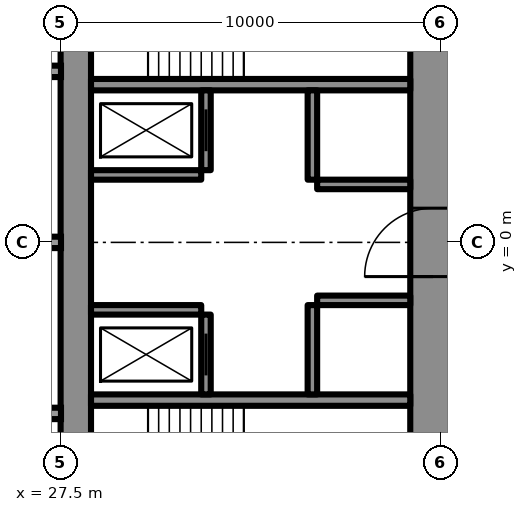
"""IFC4 building model, lengths in metres.
Left out: names, types, materials, properties, quantities, classifications, styles, units other than length and angle.
Written with IfcOpenShell. Run it as: python <this file> out.ifc"""

import sys

from ifc_helpers import new_model, si_unit, direction, frame, frame_2d, origin, place, context, subcontext, project, spatial, rectangle, extrude, element, fill, save


model = new_model("IFC4")
c1 = context("Model", 3, precision=1e-05, world=origin(), true_north=direction((0.0, 1.0)))
c2 = subcontext(c1, "Body", "Model", "MODEL_VIEW")
j1 = project(units=[si_unit("LENGTHUNIT", "METRE"), si_unit("PLANEANGLEUNIT", "RADIAN")], contexts=[c1])
p1 = place(None, origin())
s1 = spatial("IfcSite", under=j1, at=p1, CompositionType="ELEMENT")
p2 = place(p1, origin())
s2 = spatial("IfcBuilding", under=s1, at=p2, CompositionType="ELEMENT")
p3 = place(p2, frame((0.0, 0.0, 139.6)))
s3 = spatial("IfcBuildingStorey", under=s2, at=p3, CompositionType="ELEMENT", Elevation=139.6)
p4 = place(p3, frame((27.9, -8.6, 0.0), z_axis=(0.0, 0.0, 1.0), x_axis=(0.0, 1.0, 0.0)))
e1 = element("IfcWall", 1, at=p4, inside=s3, PredefinedType="SHEAR", context=c2, shape_type="SweptSolid", body=[
    extrude(rectangle(XDim=17.2, YDim=0.8, at=frame_2d((8.6, 0.0))), origin(), (0.0, 0.0, 1.0), 3.5),
])
p5 = place(p4, frame((2.45, 0.0, 0.6)))
e2 = element("IfcOpeningElement", 2, at=p5, cuts=e1, PredefinedType="OPENING", context=c2, shape_type="SweptSolid", body=[
    extrude(rectangle(XDim=0.6, YDim=2.1, at=frame_2d((0.3, 1.05))), frame((0.0, 0.41, 0.0), z_axis=(0.0, -1.0, 0.0), x_axis=(1.0, 0.0, 0.0)), (0.0, 0.0, 1.0), 0.82),
])
p6 = place(p4, frame((14.15, 0.0, 0.6)))
e3 = element("IfcOpeningElement", 3, at=p6, cuts=e1, PredefinedType="OPENING", context=c2, shape_type="SweptSolid", body=[
    extrude(rectangle(XDim=0.6, YDim=2.1, at=frame_2d((0.3, 1.05))), frame((0.0, 0.41, 0.0), z_axis=(0.0, -1.0, 0.0), x_axis=(1.0, 0.0, 0.0)), (0.0, 0.0, 1.0), 0.82),
])
p7 = place(p3, frame((37.3, -8.6, 0.0), z_axis=(0.0, 0.0, 1.0), x_axis=(0.0, 1.0, 0.0)))
e4 = element("IfcWall", 4, at=p7, inside=s3, PredefinedType="SHEAR", context=c2, shape_type="SweptSolid", body=[
    extrude(rectangle(XDim=17.2, YDim=1.2, at=frame_2d((8.6, 0.0))), origin(), (0.0, 0.0, 1.0), 3.5),
])
p8 = place(p7, frame((7.7, 0.0, 0.0)))
e5 = element("IfcOpeningElement", 5, at=p8, cuts=e4, PredefinedType="OPENING", context=c2, shape_type="SweptSolid", body=[
    extrude(rectangle(XDim=1.8, YDim=2.2, at=frame_2d((0.9, 1.1))), frame((0.0, 0.61, 0.0), z_axis=(0.0, -1.0, 0.0), x_axis=(1.0, 0.0, 0.0)), (0.0, 0.0, 1.0), 1.22),
])
for number, where, z_axis, x_axis in (
    (6, (28.3, -4.15, 0.0), (0.0, 0.0, 1.0), (1.0, 0.0, 0.0)),
    (7, (28.3, 4.15, 0.0), (0.0, 0.0, 1.0), (1.0, 0.0, 0.0)),
):
    element("IfcWall", number, at=place(p3, frame(where, z_axis=z_axis, x_axis=x_axis)), inside=s3, PredefinedType="SHEAR", context=c2, shape_type="SweptSolid", body=[
        extrude(rectangle(XDim=8.4, YDim=0.3, at=frame_2d((4.2, 0.0))), origin(), (0.0, 0.0, 1.0), 3.5),
    ])
p9 = place(p3, frame((31.325, -4.0, 0.0), z_axis=(0.0, 0.0, 1.0), x_axis=(0.0, 1.0, 0.0)))
e8 = element("IfcWall", 8, at=p9, inside=s3, PredefinedType="SHEAR", context=c2, shape_type="SweptSolid", body=[
    extrude(rectangle(XDim=2.1, YDim=0.25, at=frame_2d((1.05, 0.0))), origin(), (0.0, 0.0, 1.0), 3.5),
])
p10 = place(p9, frame((0.5, 0.0, 0.0)))
e9 = element("IfcOpeningElement", 9, at=p10, cuts=e8, PredefinedType="OPENING", context=c2, shape_type="SweptSolid", body=[
    extrude(rectangle(XDim=1.1, YDim=2.2, at=frame_2d((0.55, 1.1))), frame((0.0, 0.135, 0.0), z_axis=(0.0, -1.0, 0.0), x_axis=(1.0, 0.0, 0.0)), (0.0, 0.0, 1.0), 0.27),
])
p11 = place(p3, frame((34.125, -4.0, 0.0), z_axis=(0.0, 0.0, 1.0), x_axis=(0.0, 1.0, 0.0)))
e10 = element("IfcWall", 10, at=p11, inside=s3, PredefinedType="SHEAR", context=c2, shape_type="SweptSolid", body=[
    extrude(rectangle(XDim=2.35, YDim=0.25, at=frame_2d((1.175, 0.0))), origin(), (0.0, 0.0, 1.0), 3.5),
])
p12 = place(p3, frame((28.3, -1.775, 0.0), z_axis=(0.0, 0.0, 1.0), x_axis=(1.0, 0.0, 0.0)))
e11 = element("IfcWall", 11, at=p12, inside=s3, PredefinedType="SHEAR", context=c2, shape_type="SweptSolid", body=[
    extrude(rectangle(XDim=2.9, YDim=0.25, at=frame_2d((1.45, 0.0))), origin(), (0.0, 0.0, 1.0), 3.5),
])
p13 = place(p3, frame((34.25, -1.525, 0.0), z_axis=(0.0, 0.0, 1.0), x_axis=(1.0, 0.0, 0.0)))
e12 = element("IfcWall", 12, at=p13, inside=s3, PredefinedType="SHEAR", context=c2, shape_type="SweptSolid", body=[
    extrude(rectangle(XDim=2.45, YDim=0.25, at=frame_2d((1.225, 0.0))), origin(), (0.0, 0.0, 1.0), 3.5),
])
p14 = place(p3, frame((31.325, 1.9, 0.0), z_axis=(0.0, 0.0, 1.0), x_axis=(0.0, 1.0, 0.0)))
e13 = element("IfcWall", 13, at=p14, inside=s3, PredefinedType="SHEAR", context=c2, shape_type="SweptSolid", body=[
    extrude(rectangle(XDim=2.1, YDim=0.25, at=frame_2d((1.05, 0.0))), origin(), (0.0, 0.0, 1.0), 3.5),
])
p15 = place(p14, frame((0.5, 0.0, 0.0)))
e14 = element("IfcOpeningElement", 14, at=p15, cuts=e13, PredefinedType="OPENING", context=c2, shape_type="SweptSolid", body=[
    extrude(rectangle(XDim=1.1, YDim=2.2, at=frame_2d((0.55, 1.1))), frame((0.0, 0.135, 0.0), z_axis=(0.0, -1.0, 0.0), x_axis=(1.0, 0.0, 0.0)), (0.0, 0.0, 1.0), 0.27),
])
p16 = place(p3, frame((34.125, 1.65, 0.0), z_axis=(0.0, 0.0, 1.0), x_axis=(0.0, 1.0, 0.0)))
e15 = element("IfcWall", 15, at=p16, inside=s3, PredefinedType="SHEAR", context=c2, shape_type="SweptSolid", body=[
    extrude(rectangle(XDim=2.35, YDim=0.25, at=frame_2d((1.175, 0.0))), origin(), (0.0, 0.0, 1.0), 3.5),
])
p17 = place(p3, frame((28.3, 1.775, 0.0), z_axis=(0.0, 0.0, 1.0), x_axis=(1.0, 0.0, 0.0)))
e16 = element("IfcWall", 16, at=p17, inside=s3, PredefinedType="SHEAR", context=c2, shape_type="SweptSolid", body=[
    extrude(rectangle(XDim=2.9, YDim=0.25, at=frame_2d((1.45, 0.0))), origin(), (0.0, 0.0, 1.0), 3.5),
])
p18 = place(p3, frame((34.25, 1.525, 0.0), z_axis=(0.0, 0.0, 1.0), x_axis=(1.0, 0.0, 0.0)))
e17 = element("IfcWall", 17, at=p18, inside=s3, PredefinedType="SHEAR", context=c2, shape_type="SweptSolid", body=[
    extrude(rectangle(XDim=2.45, YDim=0.25, at=frame_2d((1.225, 0.0))), origin(), (0.0, 0.0, 1.0), 3.5),
])
p19 = place(p3, frame((27.2, -13.8, 0.0), z_axis=(0.0, 0.0, 1.0), x_axis=(0.866027159892, 0.499996958321, 0.0)))
e18 = element("IfcWall", 18, at=p19, inside=s3, PredefinedType="SHEAR", context=c2, shape_type="SweptSolid", body=[
    extrude(rectangle(XDim=27.947, YDim=1.2, at=frame_2d((13.973, 0.0))), origin(), (0.0, 0.0, 1.0), 3.5),
])
p20 = place(p19, frame((4.6, 0.0, 0.0)))
e19 = element("IfcOpeningElement", 19, at=p20, cuts=e18, PredefinedType="OPENING", context=c2, shape_type="SweptSolid", body=[
    extrude(rectangle(XDim=1.0, YDim=2.2, at=frame_2d((0.5, 1.1))), frame((0.0, 0.61, 0.0), z_axis=(0.0, -1.0, 0.0), x_axis=(1.0, 0.0, 0.0)), (0.0, 0.0, 1.0), 1.22),
])
p21 = place(p19, frame((13.395, 0.0, 0.0)))
e20 = element("IfcOpeningElement", 20, at=p21, cuts=e18, PredefinedType="OPENING", context=c2, shape_type="SweptSolid", body=[
    extrude(rectangle(XDim=1.8, YDim=2.2, at=frame_2d((0.9, 1.1))), frame((0.0, 0.61, 0.0), z_axis=(0.0, -1.0, 0.0), x_axis=(1.0, 0.0, 0.0)), (0.0, 0.0, 1.0), 1.22),
])
p22 = place(p3, frame((27.2, 13.8, 0.0), z_axis=(0.0, 0.0, 1.0), x_axis=(0.866024515034, -0.500001539357, 0.0)))
e21 = element("IfcWall", 21, at=p22, inside=s3, PredefinedType="SHEAR", context=c2, shape_type="SweptSolid", body=[
    extrude(rectangle(XDim=26.907, YDim=1.2, at=frame_2d((13.454, 0.0))), origin(), (0.0, 0.0, 1.0), 3.5),
])
p23 = place(p22, frame((4.6, 0.0, 0.0)))
e22 = element("IfcOpeningElement", 22, at=p23, cuts=e21, PredefinedType="OPENING", context=c2, shape_type="SweptSolid", body=[
    extrude(rectangle(XDim=1.0, YDim=2.2, at=frame_2d((0.5, 1.1))), frame((0.0, 0.61, 0.0), z_axis=(0.0, -1.0, 0.0), x_axis=(1.0, 0.0, 0.0)), (0.0, 0.0, 1.0), 1.22),
])
p24 = place(p22, frame((13.395, 0.0, 0.0)))
e23 = element("IfcOpeningElement", 23, at=p24, cuts=e21, PredefinedType="OPENING", context=c2, shape_type="SweptSolid", body=[
    extrude(rectangle(XDim=1.8, YDim=2.2, at=frame_2d((0.9, 1.1))), frame((0.0, 0.61, 0.0), z_axis=(0.0, -1.0, 0.0), x_axis=(1.0, 0.0, 0.0)), (0.0, 0.0, 1.0), 1.22),
])
p25 = place(p3, frame((36.834, 10.894, 0.0), z_axis=(0.0, 0.0, 1.0), x_axis=(0.866028157229, -0.499995230863, 0.0)))
e24 = element("IfcWall", 24, at=p25, inside=s3, PredefinedType="PARTITIONING", context=c2, shape_type="SweptSolid", body=[
    extrude(rectangle(XDim=21.667, YDim=0.2, at=frame_2d((10.833, 0.0))), origin(), (0.0, 0.0, 1.0), 3.25),
])
p26 = place(p25, frame((20.117, 0.0, 0.0)))
e25 = element("IfcOpeningElement", 25, at=p26, cuts=e24, PredefinedType="OPENING", context=c2, shape_type="SweptSolid", body=[
    extrude(rectangle(XDim=0.95, YDim=2.2, at=frame_2d((0.475, 1.1))), frame((0.0, 0.11, 0.0), z_axis=(0.0, -1.0, 0.0), x_axis=(1.0, 0.0, 0.0)), (0.0, 0.0, 1.0), 0.22),
])
p27 = place(p25, frame((14.938, 0.0, 0.0)))
e26 = element("IfcOpeningElement", 26, at=p27, cuts=e24, PredefinedType="OPENING", context=c2, shape_type="SweptSolid", body=[
    extrude(rectangle(XDim=1.8, YDim=2.2, at=frame_2d((0.9, 1.1))), frame((0.0, 0.11, 0.0), z_axis=(0.0, -1.0, 0.0), x_axis=(1.0, 0.0, 0.0)), (0.0, 0.0, 1.0), 0.22),
])
p28 = place(p25, frame((9.99, 0.0, 0.0)))
e27 = element("IfcOpeningElement", 27, at=p28, cuts=e24, PredefinedType="OPENING", context=c2, shape_type="SweptSolid", body=[
    extrude(rectangle(XDim=0.95, YDim=2.2, at=frame_2d((0.475, 1.1))), frame((0.0, 0.11, 0.0), z_axis=(0.0, -1.0, 0.0), x_axis=(1.0, 0.0, 0.0)), (0.0, 0.0, 1.0), 0.22),
])
p29 = place(p25, frame((3.35, 0.0, 0.0)))
e28 = element("IfcOpeningElement", 28, at=p29, cuts=e24, PredefinedType="OPENING", context=c2, shape_type="SweptSolid", body=[
    extrude(rectangle(XDim=1.0, YDim=2.2, at=frame_2d((0.5, 1.1))), frame((0.0, 0.11, 0.0), z_axis=(0.0, -1.0, 0.0), x_axis=(1.0, 0.0, 0.0)), (0.0, 0.0, 1.0), 0.22),
])
p30 = place(p8, origin())
e29 = element("IfcDoor", 29, at=p30, inside=s3, OperationType="DOUBLE_DOOR_SINGLE_SWING", PredefinedType="DOOR", context=c2, shape_type="SweptSolid", body=[
    extrude(rectangle(XDim=1.8, YDim=2.2, at=frame_2d((0.9, 1.1))), frame((0.0, 0.025, 0.0), z_axis=(0.0, -1.0, 0.0), x_axis=(1.0, 0.0, 0.0)), (0.0, 0.0, 1.0), 0.05),
])
fill(e5, e29)
p31 = place(p10, origin())
e30 = element("IfcDoor", 30, at=p31, inside=s3, OperationType="SLIDING_TO_LEFT", PredefinedType="USERDEFINED", context=c2, shape_type="SweptSolid", body=[
    extrude(rectangle(XDim=1.1, YDim=2.2, at=frame_2d((0.55, 1.1))), frame((0.0, 0.025, 0.0), z_axis=(0.0, -1.0, 0.0), x_axis=(1.0, 0.0, 0.0)), (0.0, 0.0, 1.0), 0.05),
])
fill(e9, e30)
p32 = place(p15, origin())
e31 = element("IfcDoor", 31, at=p32, inside=s3, OperationType="SLIDING_TO_LEFT", PredefinedType="USERDEFINED", context=c2, shape_type="SweptSolid", body=[
    extrude(rectangle(XDim=1.1, YDim=2.2, at=frame_2d((0.55, 1.1))), frame((0.0, 0.025, 0.0), z_axis=(0.0, -1.0, 0.0), x_axis=(1.0, 0.0, 0.0)), (0.0, 0.0, 1.0), 0.05),
])
fill(e14, e31)
save(model, sys.argv[1])
